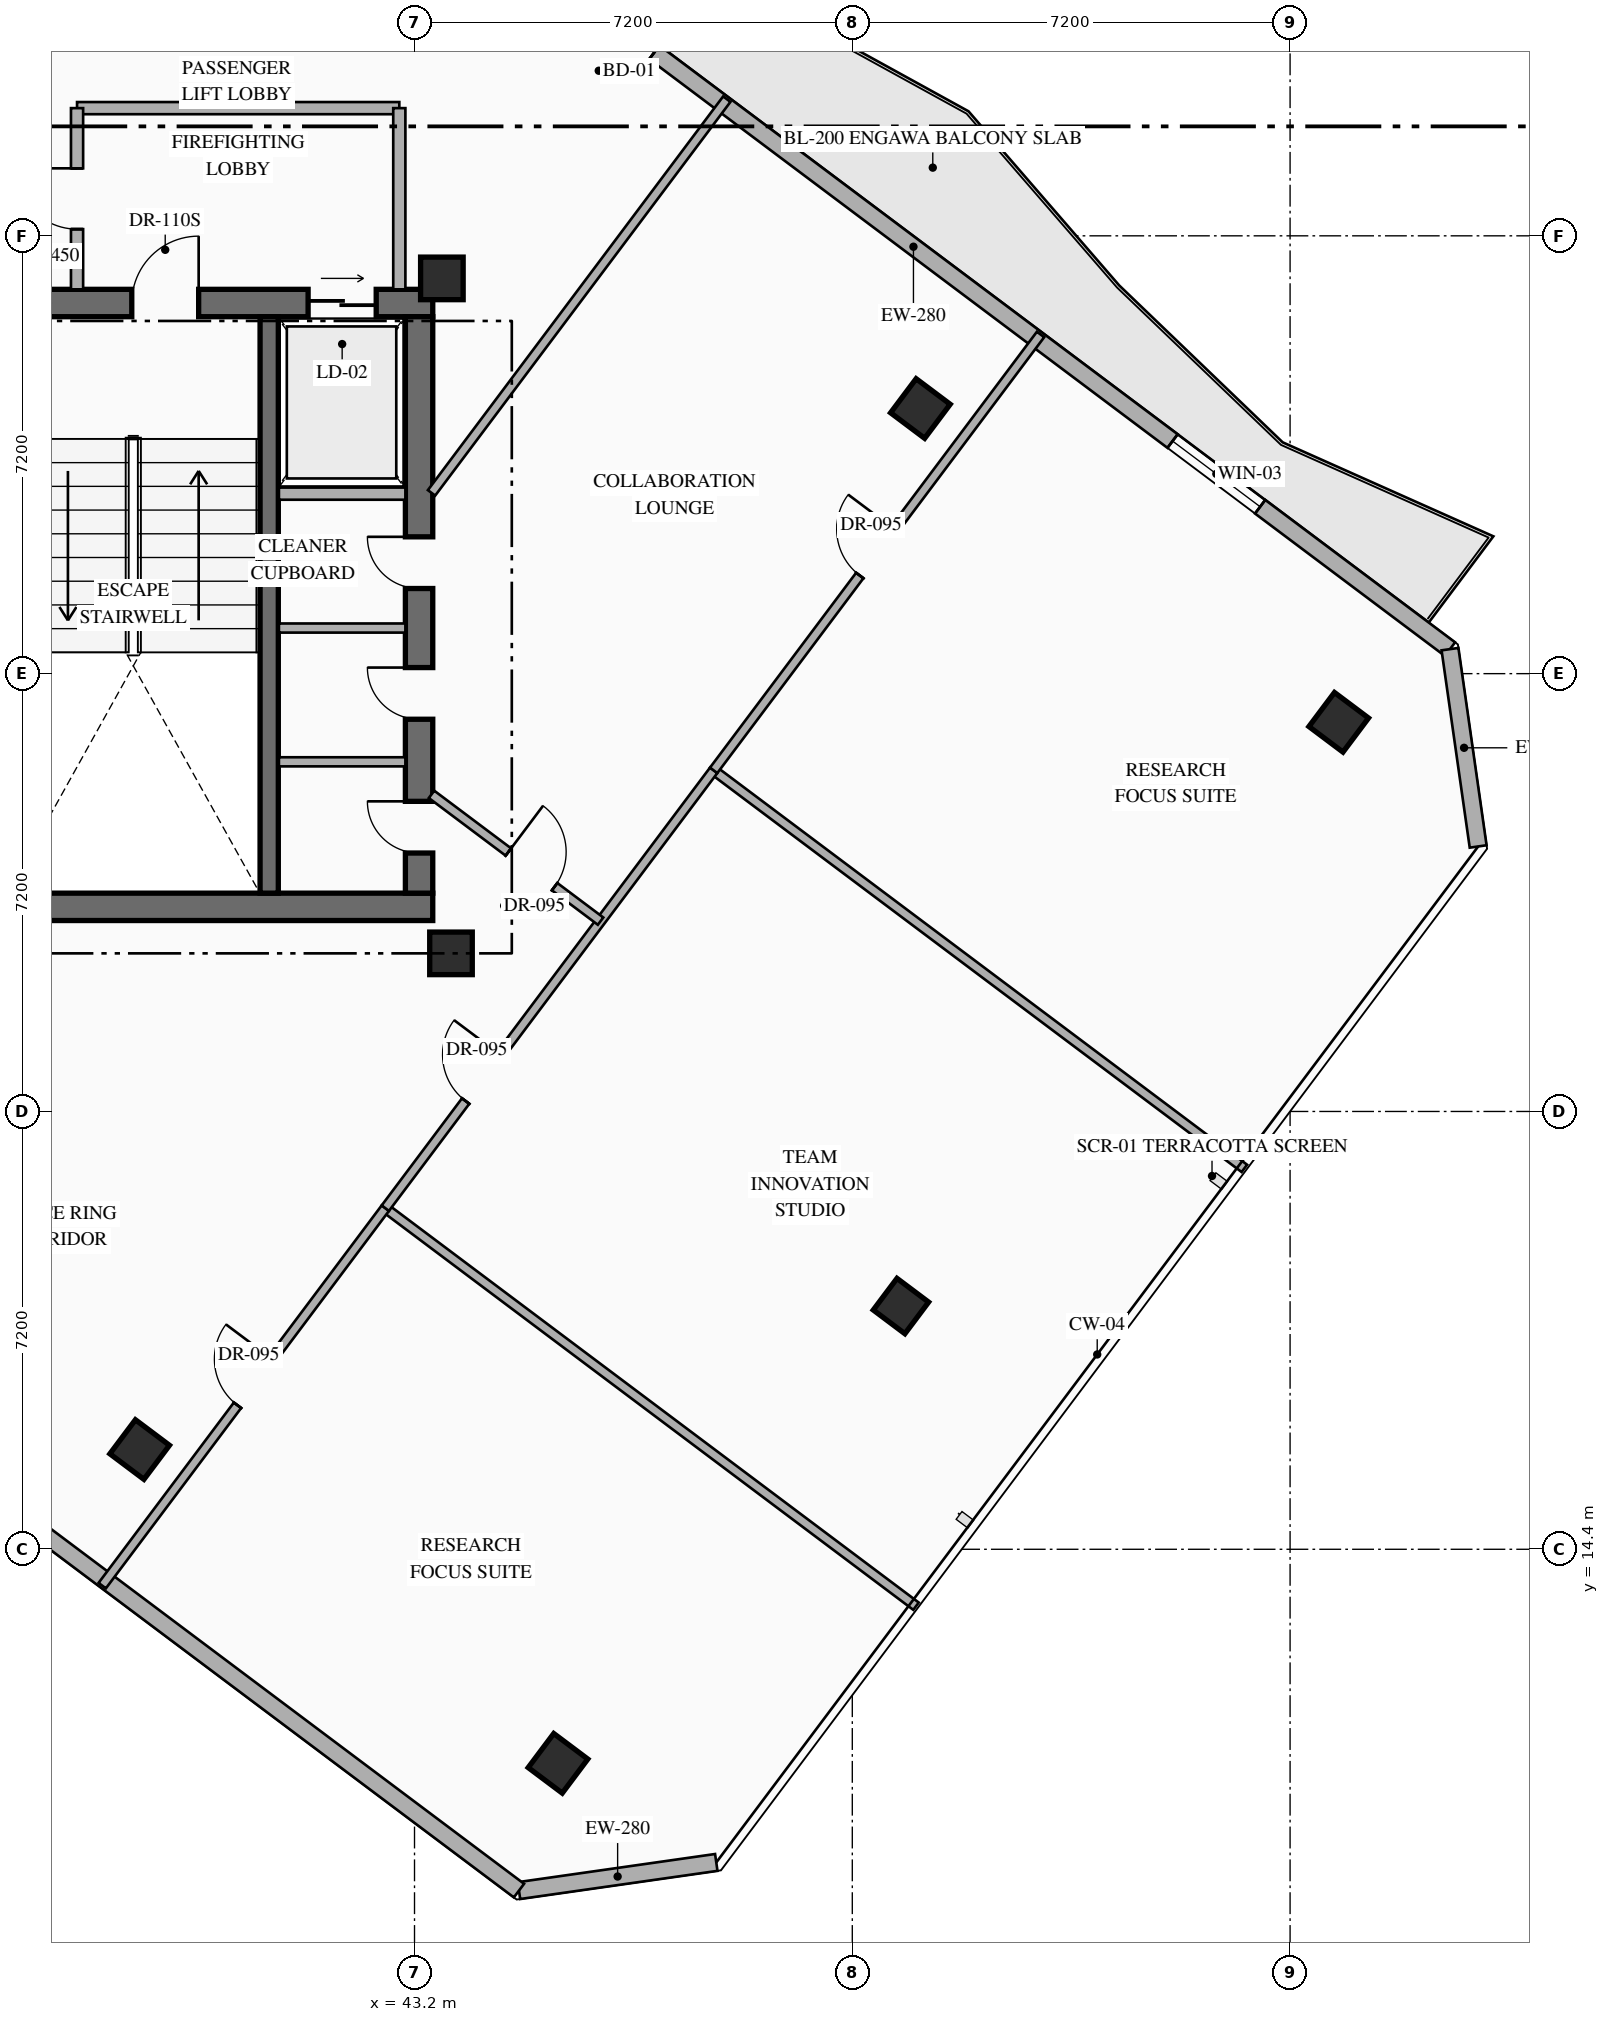
"""IFC4 building model, lengths in metres.
Left out: names, types, materials, properties, quantities, classifications, styles, units other than length and angle.
Written with IfcOpenShell. Run it as: python <this file> out.ifc"""

import sys

from ifc_helpers import new_model, si_unit, direction, frame, frame_2d, origin, origin_2d, place, context, subcontext, project, spatial, rectangle, hollow_rectangle, extrude, element, fill, save


model = new_model("IFC4")
c1 = context("Model", 3, precision=1e-05, world=origin(), true_north=direction((0.0, 1.0)))
c2 = subcontext(c1, "Body", "Model", "MODEL_VIEW")
j1 = project(units=[si_unit("LENGTHUNIT", "METRE"), si_unit("PLANEANGLEUNIT", "RADIAN")], contexts=[c1])
p1 = place(None, origin())
s1 = spatial("IfcSite", under=j1, at=p1, CompositionType="ELEMENT")
p2 = place(p1, origin())
s2 = spatial("IfcBuilding", under=s1, at=p2, CompositionType="ELEMENT")
p3 = place(p2, frame((0.0, 0.0, 227.55)))
s3 = spatial("IfcBuildingStorey", under=s2, at=p3, CompositionType="ELEMENT", Elevation=227.55)
p4 = place(p3, frame((36.04, 24.965, 0.0), z_axis=(0.0, 0.0, 1.0), x_axis=(1.0, 0.0, 0.0)))
e1 = element("IfcWall", 1, at=p4, inside=s3, PredefinedType="SHEAR", context=c2, shape_type="SweptSolid", body=[
    extrude(rectangle(XDim=7.46, YDim=0.45, at=frame_2d((3.73, 0.0))), origin(), (0.0, 0.0, 1.0), 3.6),
])
p5 = place(p3, frame((36.04, 34.895, 0.0), z_axis=(0.0, 0.0, 1.0), x_axis=(1.0, 0.0, 0.0)))
e2 = element("IfcWall", 2, at=p5, inside=s3, PredefinedType="SHEAR", context=c2, shape_type="SweptSolid", body=[
    extrude(rectangle(XDim=7.46, YDim=0.45, at=frame_2d((3.73, 0.0))), origin(), (0.0, 0.0, 1.0), 3.6),
])
p6 = place(p5, frame((2.51, 0.0, 0.0)))
e3 = element("IfcOpeningElement", 3, at=p6, cuts=e2, PredefinedType="OPENING", context=c2, shape_type="SweptSolid", body=[
    extrude(rectangle(XDim=1.1, YDim=2.2, at=frame_2d((0.55, 1.1))), frame((0.0, 0.235, 0.0), z_axis=(0.0, -1.0, 0.0), x_axis=(1.0, 0.0, 0.0)), (0.0, 0.0, 1.0), 0.47),
])
p7 = place(p5, frame((5.41, 0.0, 0.0)))
e4 = element("IfcOpeningElement", 4, at=p7, cuts=e2, PredefinedType="OPENING", context=c2, shape_type="SweptSolid", body=[
    extrude(rectangle(XDim=1.12, YDim=2.15, at=frame_2d((0.56, 1.075))), frame((0.0, 0.235, 0.0), z_axis=(0.0, -1.0, 0.0), x_axis=(1.0, 0.0, 0.0)), (0.0, 0.0, 1.0), 0.47),
])
p8 = place(p3, frame((43.275, 25.19, 0.0), z_axis=(0.0, 0.0, 1.0), x_axis=(0.0, 1.0, 0.0)))
e5 = element("IfcWall", 5, at=p8, inside=s3, PredefinedType="SHEAR", context=c2, shape_type="SweptSolid", body=[
    extrude(rectangle(XDim=9.48, YDim=0.45, at=frame_2d((4.74, 0.0))), origin(), (0.0, 0.0, 1.0), 3.6),
])
p9 = place(p8, frame((0.66, 0.0, 0.0)))
e6 = element("IfcOpeningElement", 6, at=p9, cuts=e5, PredefinedType="OPENING", context=c2, shape_type="SweptSolid", body=[
    extrude(rectangle(XDim=0.85, YDim=2.08, at=frame_2d((0.425, 1.04))), frame((0.0, 0.235, 0.0), z_axis=(0.0, -1.0, 0.0), x_axis=(1.0, 0.0, 0.0)), (0.0, 0.0, 1.0), 0.47),
])
p10 = place(p8, frame((2.86, 0.0, 0.0)))
e7 = element("IfcOpeningElement", 7, at=p10, cuts=e5, PredefinedType="OPENING", context=c2, shape_type="SweptSolid", body=[
    extrude(rectangle(XDim=0.85, YDim=2.08, at=frame_2d((0.425, 1.04))), frame((0.0, 0.235, 0.0), z_axis=(0.0, -1.0, 0.0), x_axis=(1.0, 0.0, 0.0)), (0.0, 0.0, 1.0), 0.47),
])
p11 = place(p8, frame((5.01, 0.0, 0.0)))
e8 = element("IfcOpeningElement", 8, at=p11, cuts=e5, PredefinedType="OPENING", context=c2, shape_type="SweptSolid", body=[
    extrude(rectangle(XDim=0.85, YDim=2.08, at=frame_2d((0.425, 1.04))), frame((0.0, 0.235, 0.0), z_axis=(0.0, -1.0, 0.0), x_axis=(1.0, 0.0, 0.0)), (0.0, 0.0, 1.0), 0.47),
])
p12 = place(p3, frame((40.81, 25.19, 0.0), z_axis=(0.0, 0.0, 1.0), x_axis=(0.0, 1.0, 0.0)))
e9 = element("IfcWall", 9, at=p12, inside=s3, PredefinedType="SHEAR", context=c2, shape_type="SweptSolid", body=[
    extrude(rectangle(XDim=9.48, YDim=0.3, at=frame_2d((4.74, 0.0))), origin(), (0.0, 0.0, 1.0), 3.6),
])
for number, where, z_axis, x_axis in (
    (10, (43.8, 24.2, 0.0), (0.0, 0.0, 1.0), (1.0, 0.0, 0.0)),
    (11, (43.65, 35.3, 0.0), (0.0, 0.0, 1.0), (1.0, 0.0, 0.0)),
    (12, (38.68, 16.04, 0.0), (0.0, 0.0, 1.0), (0.8, -0.6, 0.0)),
    (13, (51.52, 33.16, 0.0), (0.0, 0.0, 1.0), (0.8, -0.6, 0.0)),
    (14, (45.56, 10.88, 0.0), (0.0, 0.0, 1.0), (0.8, -0.6, 0.0)),
    (15, (58.4, 28.0, 0.0), (0.0, 0.0, 1.0), (0.8, -0.6, 0.0)),
):
    element("IfcColumn", number, at=place(p3, frame(where, z_axis=z_axis, x_axis=x_axis)), inside=s3, PredefinedType="COLUMN", context=c2, shape_type="SweptSolid", body=[
        extrude(hollow_rectangle(XDim=0.7, YDim=0.7, WallThickness=0.028, at=origin_2d()), origin(), (0.0, 0.0, 1.0), 3.6),
    ])
p13 = place(p3, frame((51.2, 18.4, 0.0), z_axis=(0.0, 0.0, 1.0), x_axis=(0.799999996291, -0.600000004945, 0.0)))
e16 = element("IfcColumn", 16, at=p13, inside=s3, PredefinedType="COLUMN", context=c2, shape_type="SweptSolid", body=[
    extrude(hollow_rectangle(XDim=0.65, YDim=0.65, WallThickness=0.025, at=origin_2d()), origin(), (0.0, 0.0, 1.0), 3.6),
])
p14 = place(p3, frame((44.86, 40.73, 0.0), z_axis=(0.0, 0.0, 1.0), x_axis=(0.800007624502, -0.599989833863, 0.0)))
e17 = element("IfcWall", 17, at=p14, inside=s3, PredefinedType="STANDARD", context=c2, shape_type="SweptSolid", body=[
    extrude(rectangle(XDim=19.212, YDim=0.28, at=frame_2d((9.606, 0.0))), origin(), (0.0, 0.0, 1.0), 3.35),
])
p15 = place(p14, frame((1.755, 0.0, 0.0)))
e18 = element("IfcOpeningElement", 18, at=p15, cuts=e17, PredefinedType="OPENING", context=c2, shape_type="SweptSolid", body=[
    extrude(rectangle(XDim=1.1, YDim=2.2, at=frame_2d((0.55, 1.1))), frame((0.0, 0.15, 0.0), z_axis=(0.0, -1.0, 0.0), x_axis=(1.0, 0.0, 0.0)), (0.0, 0.0, 1.0), 0.3),
])
p16 = place(p14, frame((13.509, 0.0, 0.85)))
e19 = element("IfcOpeningElement", 19, at=p16, cuts=e17, PredefinedType="OPENING", context=c2, shape_type="SweptSolid", body=[
    extrude(rectangle(XDim=1.8, YDim=2.1, at=frame_2d((0.9, 1.05))), frame((0.0, 0.15, 0.0), z_axis=(0.0, -1.0, 0.0), x_axis=(1.0, 0.0, 0.0)), (0.0, 0.0, 1.0), 0.3),
])
p17 = place(p3, frame((60.23, 29.203, 0.0), z_axis=(0.0, 0.0, 1.0), x_axis=(0.141296221922, -0.989967361922, 0.0)))
e20 = element("IfcWall", 20, at=p17, inside=s3, PredefinedType="STANDARD", context=c2, shape_type="SweptSolid", body=[
    extrude(rectangle(XDim=3.278, YDim=0.28, at=frame_2d((1.639, 0.0))), origin(), (0.0, 0.0, 1.0), 3.35),
])
p18 = place(p3, frame((48.163, 9.25, 0.0), z_axis=(0.0, 0.0, 1.0), x_axis=(-0.989979263428, -0.141212810973, 0.0)))
e21 = element("IfcWall", 21, at=p18, inside=s3, PredefinedType="STANDARD", context=c2, shape_type="SweptSolid", body=[
    extrude(rectangle(XDim=3.278, YDim=0.28, at=frame_2d((1.639, 0.0))), origin(), (0.0, 0.0, 1.0), 3.35),
])
p19 = place(p3, frame((44.918, 8.787, 0.0), z_axis=(0.0, 0.0, 1.0), x_axis=(-0.800004765927, 0.599993645378, 0.0)))
e22 = element("IfcWall", 22, at=p19, inside=s3, PredefinedType="STANDARD", context=c2, shape_type="SweptSolid", body=[
    extrude(rectangle(XDim=24.588, YDim=0.28, at=frame_2d((12.294, 0.0))), origin(), (0.0, 0.0, 1.0), 3.35),
])
p20 = place(p3, frame((40.97, 31.76, 0.0), z_axis=(0.0, 0.0, 1.0), x_axis=(1.0, 0.0, 0.0)))
e23 = element("IfcWall", 23, at=p20, inside=s3, PredefinedType="STANDARD", context=c2, shape_type="SweptSolid", body=[
    extrude(rectangle(XDim=2.08, YDim=0.2, at=frame_2d((1.04, 0.0))), origin(), (0.0, 0.0, 1.0), 3.35),
])
for number, where, z_axis, x_axis in (
    (24, (40.97, 27.35, 0.0), (0.0, 0.0, 1.0), (1.0, 0.0, 0.0)),
    (25, (40.97, 29.55, 0.0), (0.0, 0.0, 1.0), (1.0, 0.0, 0.0)),
):
    element("IfcWall", number, at=place(p3, frame(where, z_axis=z_axis, x_axis=x_axis)), inside=s3, PredefinedType="PARTITIONING", context=c2, shape_type="SweptSolid", body=[
        extrude(rectangle(XDim=2.08, YDim=0.15, at=frame_2d((1.04, 0.0))), origin(), (0.0, 0.0, 1.0), 3.35),
    ])
p21 = place(p3, frame((37.65, 38.1, 0.0), z_axis=(0.0, 0.0, 1.0), x_axis=(1.0, 0.0, 0.0)))
e26 = element("IfcWall", 26, at=p21, inside=s3, PredefinedType="STANDARD", context=c2, shape_type="SweptSolid", body=[
    extrude(rectangle(XDim=5.3, YDim=0.2, at=frame_2d((2.65, 0.0))), origin(), (0.0, 0.0, 1.0), 3.35),
])
p22 = place(p3, frame((42.95, 35.12, 0.0), z_axis=(0.0, 0.0, 1.0), x_axis=(0.0, 1.0, 0.0)))
e27 = element("IfcWall", 27, at=p22, inside=s3, PredefinedType="STANDARD", context=c2, shape_type="SweptSolid", body=[
    extrude(rectangle(XDim=2.98, YDim=0.2, at=frame_2d((1.49, 0.0))), origin(), (0.0, 0.0, 1.0), 3.35),
])
p23 = place(p3, frame((37.65, 35.12, 0.0), z_axis=(0.0, 0.0, 1.0), x_axis=(0.0, 1.0, 0.0)))
e28 = element("IfcWall", 28, at=p23, inside=s3, PredefinedType="STANDARD", context=c2, shape_type="SweptSolid", body=[
    extrude(rectangle(XDim=2.98, YDim=0.2, at=frame_2d((1.49, 0.0))), origin(), (0.0, 0.0, 1.0), 3.35),
])
p24 = place(p23, frame((0.99, 0.0, 0.0)))
e29 = element("IfcOpeningElement", 29, at=p24, cuts=e28, PredefinedType="OPENING", context=c2, shape_type="SweptSolid", body=[
    extrude(rectangle(XDim=1.0, YDim=2.2, at=frame_2d((0.5, 1.1))), frame((0.0, 0.11, 0.0), z_axis=(0.0, -1.0, 0.0), x_axis=(1.0, 0.0, 0.0)), (0.0, 0.0, 1.0), 0.22),
])
p25 = place(p3, frame((42.72, 20.01, 0.0), z_axis=(0.0, 0.0, 1.0), x_axis=(0.800005370633, -0.599992839089, 0.0)))
e30 = element("IfcWall", 30, at=p25, inside=s3, PredefinedType="PARTITIONING", context=c2, shape_type="SweptSolid", body=[
    extrude(rectangle(XDim=10.91, YDim=0.15, at=frame_2d((5.455, 0.0))), origin(), (0.0, 0.0, 1.0), 3.35),
])
p26 = place(p3, frame((38.064, 13.802, 0.0), z_axis=(0.0, 0.0, 1.0), x_axis=(0.6, 0.8, 0.0)))
e31 = element("IfcWall", 31, at=p26, inside=s3, PredefinedType="PARTITIONING", context=c2, shape_type="SweptSolid", body=[
    extrude(rectangle(XDim=7.76, YDim=0.15, at=frame_2d((3.88, 0.0))), origin(), (0.0, 0.0, 1.0), 3.35),
])
p27 = place(p26, frame((3.708, 0.0, 0.0)))
e32 = element("IfcOpeningElement", 32, at=p27, cuts=e31, PredefinedType="OPENING", context=c2, shape_type="SweptSolid", body=[
    extrude(rectangle(XDim=0.95, YDim=2.15, at=frame_2d((0.475, 1.075))), frame((0.0, 0.085, 0.0), z_axis=(0.0, -1.0, 0.0), x_axis=(1.0, 0.0, 0.0)), (0.0, 0.0, 1.0), 0.17),
])
p28 = place(p3, frame((48.12, 27.21, 0.0), z_axis=(0.0, 0.0, 1.0), x_axis=(0.799997314611, -0.600003580502, 0.0)))
e33 = element("IfcWall", 33, at=p28, inside=s3, PredefinedType="PARTITIONING", context=c2, shape_type="SweptSolid", body=[
    extrude(rectangle(XDim=10.91, YDim=0.15, at=frame_2d((5.455, 0.0))), origin(), (0.0, 0.0, 1.0), 3.045),
])
p29 = place(p3, frame((42.72, 20.01, 0.0), z_axis=(0.0, 0.0, 1.0), x_axis=(0.600013020683, 0.799990234322, 0.0)))
e34 = element("IfcWall", 34, at=p29, inside=s3, PredefinedType="PARTITIONING", context=c2, shape_type="SweptSolid", body=[
    extrude(rectangle(XDim=9.0, YDim=0.15, at=frame_2d((4.5, 0.0))), origin(), (0.0, 0.0, 1.0), 3.35),
])
p30 = place(p29, frame((2.202, 0.0, 0.0)))
e35 = element("IfcOpeningElement", 35, at=p30, cuts=e34, PredefinedType="OPENING", context=c2, shape_type="SweptSolid", body=[
    extrude(rectangle(XDim=0.95, YDim=2.15, at=frame_2d((0.475, 1.075))), frame((0.0, 0.085, 0.0), z_axis=(0.0, -1.0, 0.0), x_axis=(1.0, 0.0, 0.0)), (0.0, 0.0, 1.0), 0.17),
])
p31 = place(p3, frame((48.12, 27.21, 0.0), z_axis=(0.0, 0.0, 1.0), x_axis=(0.6, 0.8, 0.0)))
e36 = element("IfcWall", 36, at=p31, inside=s3, PredefinedType="PARTITIONING", context=c2, shape_type="SweptSolid", body=[
    extrude(rectangle(XDim=8.96, YDim=0.15, at=frame_2d((4.48, 0.0))), origin(), (0.0, 0.0, 1.0), 3.35),
])
p32 = place(p31, frame((4.005, 0.0, 0.0)))
e37 = element("IfcOpeningElement", 37, at=p32, cuts=e36, PredefinedType="OPENING", context=c2, shape_type="SweptSolid", body=[
    extrude(rectangle(XDim=0.95, YDim=2.15, at=frame_2d((0.475, 1.075))), frame((0.0, 0.085, 0.0), z_axis=(0.0, -1.0, 0.0), x_axis=(1.0, 0.0, 0.0)), (0.0, 0.0, 1.0), 0.17),
])
p33 = place(p3, frame((43.48, 26.815, 0.0), z_axis=(0.0, 0.0, 1.0), x_axis=(0.800008430676, -0.599988758934, 0.0)))
e38 = element("IfcWall", 38, at=p33, inside=s3, PredefinedType="PARTITIONING", context=c2, shape_type="SweptSolid", body=[
    extrude(rectangle(XDim=3.475, YDim=0.15, at=frame_2d((1.738, 0.0))), origin(), (0.0, 0.0, 1.0), 3.35),
])
p34 = place(p33, frame((1.58, 0.0, 0.0)))
e39 = element("IfcOpeningElement", 39, at=p34, cuts=e38, PredefinedType="OPENING", context=c2, shape_type="SweptSolid", body=[
    extrude(rectangle(XDim=0.95, YDim=2.15, at=frame_2d((0.475, 1.075))), frame((0.0, 0.085, 0.0), z_axis=(0.0, -1.0, 0.0), x_axis=(1.0, 0.0, 0.0)), (0.0, 0.0, 1.0), 0.17),
])
p35 = place(p3, frame((43.48, 31.773, 0.0), z_axis=(0.0, 0.0, 1.0), x_axis=(0.599971041729, 0.800021717885, 0.0)))
e40 = element("IfcWall", 40, at=p35, inside=s3, PredefinedType="PARTITIONING", context=c2, shape_type="SweptSolid", body=[
    extrude(rectangle(XDim=8.094, YDim=0.15, at=frame_2d((4.047, 0.0))), origin(), (0.0, 0.0, 1.0), 3.35),
])
p36 = place(p15, origin())
e41 = element("IfcDoor", 41, at=p36, inside=s3, OperationType="SINGLE_SWING_LEFT", PredefinedType="DOOR", context=c2, shape_type="SweptSolid", body=[
    extrude(rectangle(XDim=1.1, YDim=2.2, at=frame_2d((0.55, 1.1))), frame((0.0, 0.025, 0.0), z_axis=(0.0, -1.0, 0.0), x_axis=(1.0, 0.0, 0.0)), (0.0, 0.0, 1.0), 0.05),
])
fill(e18, e41)
p37 = place(p16, origin())
e42 = element("IfcWindow", 42, at=p37, inside=s3, PartitioningType="SINGLE_PANEL", PredefinedType="WINDOW", context=c2, shape_type="SweptSolid", body=[
    extrude(rectangle(XDim=1.8, YDim=2.1, at=frame_2d((0.9, 1.05))), frame((0.0, 0.03, 0.0), z_axis=(0.0, -1.0, 0.0), x_axis=(1.0, 0.0, 0.0)), (0.0, 0.0, 1.0), 0.06),
])
fill(e19, e42)
p38 = place(p6, origin())
e43 = element("IfcDoor", 43, at=p38, inside=s3, OperationType="SINGLE_SWING_RIGHT", PredefinedType="DOOR", context=c2, shape_type="SweptSolid", body=[
    extrude(rectangle(XDim=1.1, YDim=2.2, at=frame_2d((0.55, 1.1))), frame((0.0, 0.025, 0.0), z_axis=(0.0, -1.0, 0.0), x_axis=(1.0, 0.0, 0.0)), (0.0, 0.0, 1.0), 0.05),
])
fill(e3, e43)
p39 = place(p7, origin())
e44 = element("IfcDoor", 44, at=p39, inside=s3, OperationType="SLIDING_TO_RIGHT", PredefinedType="USERDEFINED", context=c2, shape_type="SweptSolid", body=[
    extrude(rectangle(XDim=1.12, YDim=2.15, at=frame_2d((0.56, 1.075))), frame((0.0, 0.025, 0.0), z_axis=(0.0, -1.0, 0.0), x_axis=(1.0, 0.0, 0.0)), (0.0, 0.0, 1.0), 0.05),
])
fill(e4, e44)
p40 = place(p9, origin())
e45 = element("IfcDoor", 45, at=p40, inside=s3, OperationType="SINGLE_SWING_RIGHT", PredefinedType="DOOR", context=c2, shape_type="SweptSolid", body=[
    extrude(rectangle(XDim=0.85, YDim=2.08, at=frame_2d((0.425, 1.04))), frame((0.0, 0.025, 0.0), z_axis=(0.0, -1.0, 0.0), x_axis=(1.0, 0.0, 0.0)), (0.0, 0.0, 1.0), 0.05),
])
fill(e6, e45)
p41 = place(p10, origin())
e46 = element("IfcDoor", 46, at=p41, inside=s3, OperationType="SINGLE_SWING_RIGHT", PredefinedType="DOOR", context=c2, shape_type="SweptSolid", body=[
    extrude(rectangle(XDim=0.85, YDim=2.08, at=frame_2d((0.425, 1.04))), frame((0.0, 0.025, 0.0), z_axis=(0.0, -1.0, 0.0), x_axis=(1.0, 0.0, 0.0)), (0.0, 0.0, 1.0), 0.05),
])
fill(e7, e46)
p42 = place(p11, origin())
e47 = element("IfcDoor", 47, at=p42, inside=s3, OperationType="SINGLE_SWING_RIGHT", PredefinedType="DOOR", context=c2, shape_type="SweptSolid", body=[
    extrude(rectangle(XDim=0.85, YDim=2.08, at=frame_2d((0.425, 1.04))), frame((0.0, 0.025, 0.0), z_axis=(0.0, -1.0, 0.0), x_axis=(1.0, 0.0, 0.0)), (0.0, 0.0, 1.0), 0.05),
])
fill(e8, e47)
p43 = place(p24, origin())
e48 = element("IfcDoor", 48, at=p43, inside=s3, OperationType="SINGLE_SWING_RIGHT", PredefinedType="DOOR", context=c2, shape_type="SweptSolid", body=[
    extrude(rectangle(XDim=1.0, YDim=2.2, at=frame_2d((0.5, 1.1))), frame((0.0, 0.025, 0.0), z_axis=(0.0, -1.0, 0.0), x_axis=(1.0, 0.0, 0.0)), (0.0, 0.0, 1.0), 0.05),
])
fill(e29, e48)
p44 = place(p27, origin())
e49 = element("IfcDoor", 49, at=p44, inside=s3, OperationType="SINGLE_SWING_RIGHT", PredefinedType="DOOR", context=c2, shape_type="SweptSolid", body=[
    extrude(rectangle(XDim=0.95, YDim=2.15, at=frame_2d((0.475, 1.075))), frame((0.0, 0.025, 0.0), z_axis=(0.0, -1.0, 0.0), x_axis=(1.0, 0.0, 0.0)), (0.0, 0.0, 1.0), 0.05),
])
fill(e32, e49)
p45 = place(p30, origin())
e50 = element("IfcDoor", 50, at=p45, inside=s3, OperationType="SINGLE_SWING_RIGHT", PredefinedType="DOOR", context=c2, shape_type="SweptSolid", body=[
    extrude(rectangle(XDim=0.95, YDim=2.15, at=frame_2d((0.475, 1.075))), frame((0.0, 0.025, 0.0), z_axis=(0.0, -1.0, 0.0), x_axis=(1.0, 0.0, 0.0)), (0.0, 0.0, 1.0), 0.05),
])
fill(e35, e50)
p46 = place(p32, origin())
e51 = element("IfcDoor", 51, at=p46, inside=s3, OperationType="SINGLE_SWING_RIGHT", PredefinedType="DOOR", context=c2, shape_type="SweptSolid", body=[
    extrude(rectangle(XDim=0.95, YDim=2.15, at=frame_2d((0.475, 1.075))), frame((0.0, 0.025, 0.0), z_axis=(0.0, -1.0, 0.0), x_axis=(1.0, 0.0, 0.0)), (0.0, 0.0, 1.0), 0.05),
])
fill(e37, e51)
p47 = place(p34, origin())
e52 = element("IfcDoor", 52, at=p47, inside=s3, OperationType="SINGLE_SWING_LEFT", PredefinedType="DOOR", context=c2, shape_type="SweptSolid", body=[
    extrude(rectangle(XDim=0.95, YDim=2.15, at=frame_2d((0.475, 1.075))), frame((0.0, 0.025, 0.0), z_axis=(0.0, -1.0, 0.0), x_axis=(1.0, 0.0, 0.0)), (0.0, 0.0, 1.0), 0.05),
])
fill(e39, e52)
save(model, sys.argv[1])
